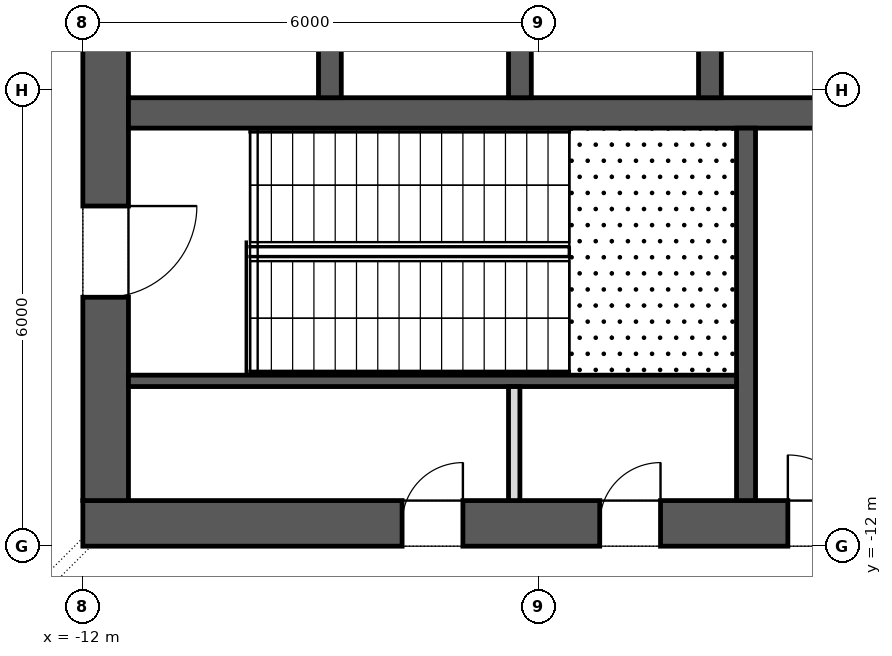
"""IFC4 building model, lengths in metres.
Left out: names, types, materials, properties, quantities, classifications, styles, units other than length and angle.
Written with IfcOpenShell. Run it as: python <this file> out.ifc"""

import sys

from ifc_helpers import new_model, si_unit, direction, frame, frame_2d, origin, place, context, subcontext, project, spatial, rectangle, extrude, element, fill, save


model = new_model("IFC4")
c1 = context("Model", 3, precision=1e-05, world=origin(), true_north=direction((0.0, 1.0)))
c2 = subcontext(c1, "Body", "Model", "MODEL_VIEW")
j1 = project(units=[si_unit("LENGTHUNIT", "METRE"), si_unit("PLANEANGLEUNIT", "RADIAN")], contexts=[c1])
p1 = place(None, origin())
s1 = spatial("IfcSite", under=j1, at=p1, CompositionType="ELEMENT")
p2 = place(p1, origin())
s2 = spatial("IfcBuilding", under=s1, at=p2, CompositionType="ELEMENT")
p3 = place(p2, frame((0.0, 0.0, 18.0)))
s3 = spatial("IfcBuildingStorey", under=s2, at=p3, CompositionType="ELEMENT", Elevation=18.0)
p4 = place(p3, frame((-12.0, -11.7, 0.0), z_axis=(0.0, 0.0, 1.0), x_axis=(1.0, 0.0, 0.0)))
e1 = element("IfcWall", 1, at=p4, inside=s3, PredefinedType="SHEAR", context=c2, shape_type="SweptSolid", body=[
    extrude(rectangle(XDim=24.0, YDim=0.6, at=frame_2d((12.0, 0.0))), origin(), (0.0, 0.0, 1.0), 5.5),
])
p5 = place(p4, frame((9.275, 0.0, 0.0)))
e2 = element("IfcOpeningElement", 2, at=p5, cuts=e1, PredefinedType="OPENING", context=c2, shape_type="SweptSolid", body=[
    extrude(rectangle(XDim=0.9, YDim=2.1, at=frame_2d((0.45, 1.05))), frame((0.0, 0.312, 0.0), z_axis=(0.0, -1.0, 0.0), x_axis=(1.0, 0.0, 0.0)), (0.0, 0.0, 1.0), 0.624),
])
p6 = place(p4, frame((10.925, 0.0, 0.0)))
e3 = element("IfcOpeningElement", 3, at=p6, cuts=e1, PredefinedType="OPENING", context=c2, shape_type="SweptSolid", body=[
    extrude(rectangle(XDim=0.9, YDim=2.1, at=frame_2d((0.45, 1.05))), frame((0.0, 0.312, 0.0), z_axis=(0.0, -1.0, 0.0), x_axis=(1.0, 0.0, 0.0)), (0.0, 0.0, 1.0), 0.624),
])
p7 = place(p4, frame((4.2, 0.0, 0.0)))
e4 = element("IfcOpeningElement", 4, at=p7, cuts=e1, PredefinedType="OPENING", context=c2, shape_type="SweptSolid", body=[
    extrude(rectangle(XDim=0.8, YDim=2.1, at=frame_2d((0.4, 1.05))), frame((0.0, 0.312, 0.0), z_axis=(0.0, -1.0, 0.0), x_axis=(1.0, 0.0, 0.0)), (0.0, 0.0, 1.0), 0.624),
])
p8 = place(p4, frame((6.8, 0.0, 0.0)))
e5 = element("IfcOpeningElement", 5, at=p8, cuts=e1, PredefinedType="OPENING", context=c2, shape_type="SweptSolid", body=[
    extrude(rectangle(XDim=0.8, YDim=2.1, at=frame_2d((0.4, 1.05))), frame((0.0, 0.312, 0.0), z_axis=(0.0, -1.0, 0.0), x_axis=(1.0, 0.0, 0.0)), (0.0, 0.0, 1.0), 0.624),
])
p9 = place(p4, frame((13.8, 0.0, 0.0)))
e6 = element("IfcOpeningElement", 6, at=p9, cuts=e1, PredefinedType="OPENING", context=c2, shape_type="SweptSolid", body=[
    extrude(rectangle(XDim=0.8, YDim=2.1, at=frame_2d((0.4, 1.05))), frame((0.0, 0.312, 0.0), z_axis=(0.0, -1.0, 0.0), x_axis=(1.0, 0.0, 0.0)), (0.0, 0.0, 1.0), 0.624),
])
p10 = place(p4, frame((16.6, 0.0, 0.0)))
e7 = element("IfcOpeningElement", 7, at=p10, cuts=e1, PredefinedType="OPENING", context=c2, shape_type="SweptSolid", body=[
    extrude(rectangle(XDim=0.8, YDim=2.1, at=frame_2d((0.4, 1.05))), frame((0.0, 0.312, 0.0), z_axis=(0.0, -1.0, 0.0), x_axis=(1.0, 0.0, 0.0)), (0.0, 0.0, 1.0), 0.624),
])
p11 = place(p3, frame((-11.7, -11.4, 0.0), z_axis=(0.0, 0.0, 1.0), x_axis=(0.0, 1.0, 0.0)))
e8 = element("IfcWall", 8, at=p11, inside=s3, PredefinedType="SHEAR", context=c2, shape_type="SweptSolid", body=[
    extrude(rectangle(XDim=22.8, YDim=0.6, at=frame_2d((11.4, 0.0))), origin(), (0.0, 0.0, 1.0), 5.5),
])
p12 = place(p11, frame((10.2, 0.0, 0.0)))
e9 = element("IfcOpeningElement", 9, at=p12, cuts=e8, PredefinedType="OPENING", context=c2, shape_type="SweptSolid", body=[
    extrude(rectangle(XDim=2.4, YDim=2.1, at=frame_2d((1.2, 1.05))), frame((0.0, 0.312, 0.0), z_axis=(0.0, -1.0, 0.0), x_axis=(1.0, 0.0, 0.0)), (0.0, 0.0, 1.0), 0.624),
])
p13 = place(p11, frame((18.925, 0.0, 0.0)))
e10 = element("IfcOpeningElement", 10, at=p13, cuts=e8, PredefinedType="OPENING", context=c2, shape_type="SweptSolid", body=[
    extrude(rectangle(XDim=1.2, YDim=2.1, at=frame_2d((0.6, 1.05))), frame((0.0, 0.312, 0.0), z_axis=(0.0, -1.0, 0.0), x_axis=(1.0, 0.0, 0.0)), (0.0, 0.0, 1.0), 0.624),
])
p14 = place(p11, frame((2.675, 0.0, 0.0)))
e11 = element("IfcOpeningElement", 11, at=p14, cuts=e8, PredefinedType="OPENING", context=c2, shape_type="SweptSolid", body=[
    extrude(rectangle(XDim=1.2, YDim=2.1, at=frame_2d((0.6, 1.05))), frame((0.0, 0.312, 0.0), z_axis=(0.0, -1.0, 0.0), x_axis=(1.0, 0.0, 0.0)), (0.0, 0.0, 1.0), 0.624),
])
p15 = place(p3, frame((-11.4, -6.3, 0.0), z_axis=(0.0, 0.0, 1.0), x_axis=(1.0, 0.0, 0.0)))
e12 = element("IfcWall", 12, at=p15, inside=s3, PredefinedType="SHEAR", context=c2, shape_type="SweptSolid", body=[
    extrude(rectangle(XDim=22.8, YDim=0.4, at=frame_2d((11.4, 0.0))), origin(), (0.0, 0.0, 1.0), 5.5),
])
p16 = place(p15, frame((20.85, 0.0, 0.0)))
e13 = element("IfcOpeningElement", 13, at=p16, cuts=e12, PredefinedType="OPENING", context=c2, shape_type="SweptSolid", body=[
    extrude(rectangle(XDim=1.1, YDim=2.1, at=frame_2d((0.55, 1.05))), frame((0.0, 0.212, 0.0), z_axis=(0.0, -1.0, 0.0), x_axis=(1.0, 0.0, 0.0)), (0.0, 0.0, 1.0), 0.424),
])
for number, where, z_axis, x_axis in (
    (14, (-8.75, -6.1, 0.0), (0.0, 0.0, 1.0), (0.0, 1.0, 0.0)),
    (15, (-6.25, -6.1, 0.0), (0.0, 0.0, 1.0), (0.0, 1.0, 0.0)),
    (16, (-3.75, -6.1, 0.0), (0.0, 0.0, 1.0), (0.0, 1.0, 0.0)),
):
    element("IfcWall", number, at=place(p3, frame(where, z_axis=z_axis, x_axis=x_axis)), inside=s3, PredefinedType="SHEAR", context=c2, shape_type="SweptSolid", body=[
        extrude(rectangle(XDim=2.9, YDim=0.3, at=frame_2d((1.45, 0.0))), origin(), (0.0, 0.0, 1.0), 5.5),
    ])
p17 = place(p3, frame((-3.275, -11.4, 0.0), z_axis=(0.0, 0.0, 1.0), x_axis=(0.0, 1.0, 0.0)))
e17 = element("IfcWall", 17, at=p17, inside=s3, PredefinedType="SHEAR", context=c2, shape_type="SweptSolid", body=[
    extrude(rectangle(XDim=4.9, YDim=0.25, at=frame_2d((2.45, 0.0))), origin(), (0.0, 0.0, 1.0), 5.2),
])
p18 = place(p3, frame((-11.4, -9.825, 0.0), z_axis=(0.0, 0.0, 1.0), x_axis=(1.0, 0.0, 0.0)))
e18 = element("IfcWall", 18, at=p18, inside=s3, PredefinedType="SHEAR", context=c2, shape_type="SweptSolid", body=[
    extrude(rectangle(XDim=8.0, YDim=0.15, at=frame_2d((4.0, 0.0))), origin(), (0.0, 0.0, 1.0), 5.2),
])
p19 = place(p3, frame((-6.325, -11.4, 0.0), z_axis=(0.0, 0.0, 1.0), x_axis=(0.0, 1.0, 0.0)))
e19 = element("IfcWall", 19, at=p19, inside=s3, PredefinedType="PARTITIONING", context=c2, shape_type="SweptSolid", body=[
    extrude(rectangle(XDim=1.5, YDim=0.15, at=frame_2d((0.75, 0.0))), origin(), (0.0, 0.0, 1.0), 5.2),
])
p20 = place(p14, frame((1.2, 0.0, 0.0), z_axis=(0.0, 0.0, 1.0), x_axis=(-1.0, 0.0, 0.0)))
e20 = element("IfcDoor", 20, at=p20, inside=s3, OperationType="SINGLE_SWING_RIGHT", PredefinedType="DOOR", context=c2, shape_type="SweptSolid", body=[
    extrude(rectangle(XDim=1.2, YDim=2.1, at=frame_2d((0.6, 1.05))), frame((0.0, 0.025, 0.0), z_axis=(0.0, -1.0, 0.0), x_axis=(1.0, 0.0, 0.0)), (0.0, 0.0, 1.0), 0.05),
])
fill(e11, e20)
p21 = place(p5, origin())
e21 = element("IfcDoor", 21, at=p21, inside=s3, OperationType="SINGLE_SWING_RIGHT", PredefinedType="DOOR", context=c2, shape_type="SweptSolid", body=[
    extrude(rectangle(XDim=0.9, YDim=2.1, at=frame_2d((0.45, 1.05))), frame((0.0, 0.025, 0.0), z_axis=(0.0, -1.0, 0.0), x_axis=(1.0, 0.0, 0.0)), (0.0, 0.0, 1.0), 0.05),
])
fill(e2, e21)
p22 = place(p7, origin())
e22 = element("IfcDoor", 22, at=p22, inside=s3, OperationType="SINGLE_SWING_LEFT", PredefinedType="DOOR", context=c2, shape_type="SweptSolid", body=[
    extrude(rectangle(XDim=0.8, YDim=2.1, at=frame_2d((0.4, 1.05))), frame((0.0, 0.025, 0.0), z_axis=(0.0, -1.0, 0.0), x_axis=(1.0, 0.0, 0.0)), (0.0, 0.0, 1.0), 0.05),
])
fill(e4, e22)
p23 = place(p8, origin())
e23 = element("IfcDoor", 23, at=p23, inside=s3, OperationType="SINGLE_SWING_LEFT", PredefinedType="DOOR", context=c2, shape_type="SweptSolid", body=[
    extrude(rectangle(XDim=0.8, YDim=2.1, at=frame_2d((0.4, 1.05))), frame((0.0, 0.025, 0.0), z_axis=(0.0, -1.0, 0.0), x_axis=(1.0, 0.0, 0.0)), (0.0, 0.0, 1.0), 0.05),
])
fill(e5, e23)
save(model, sys.argv[1])
